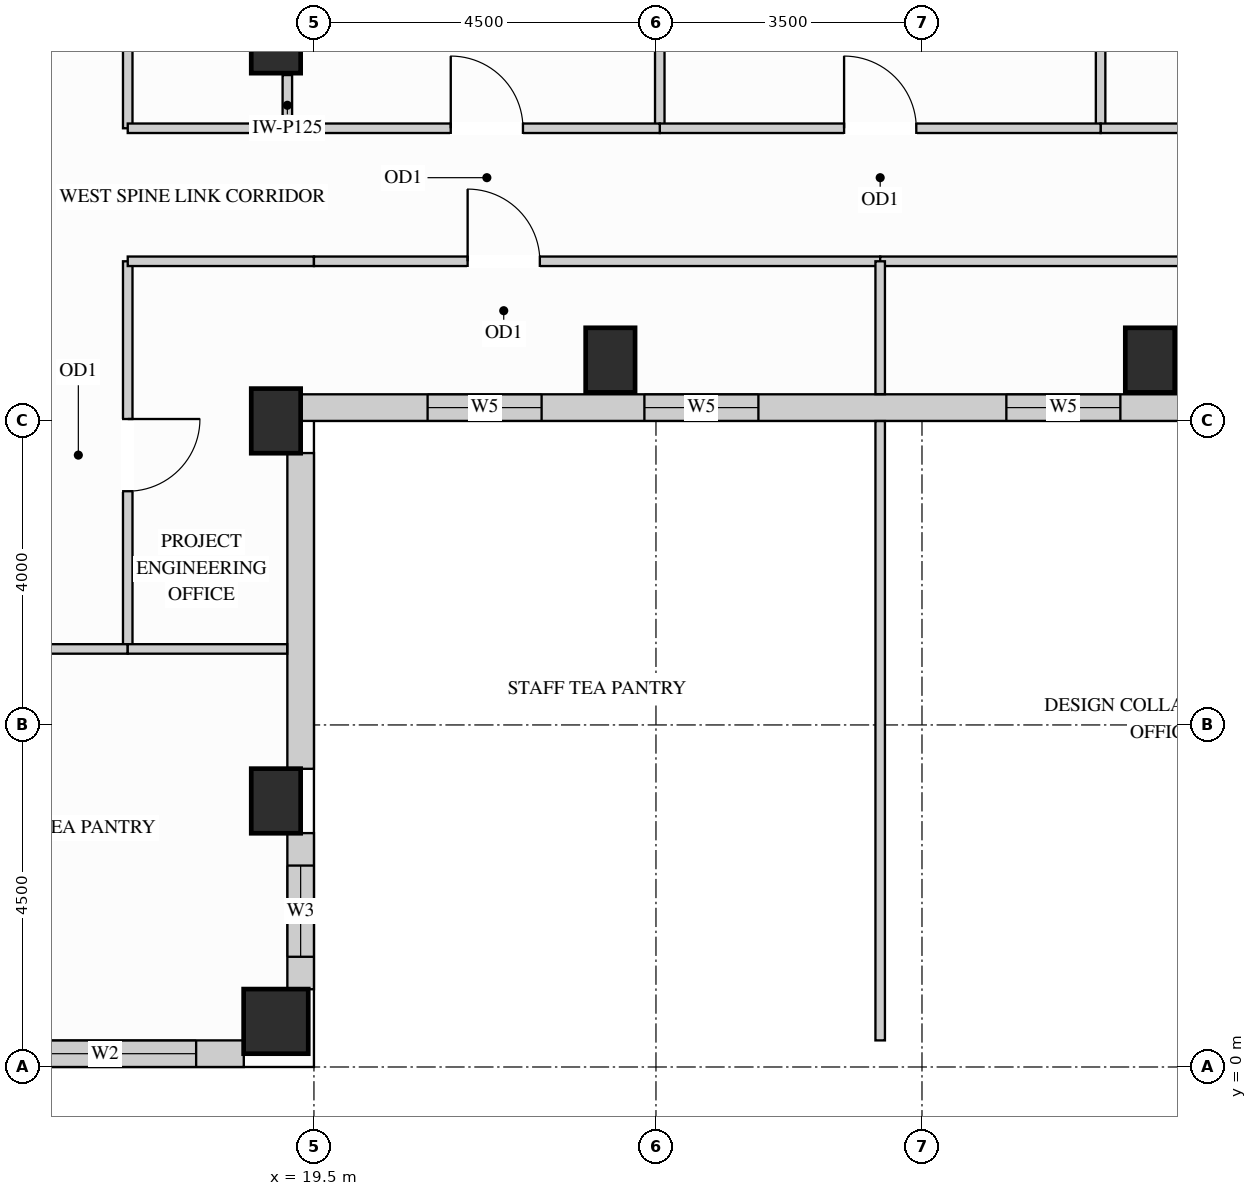
"""IFC4 building model, lengths in metres.
Left out: names, types, materials, properties, quantities, classifications, styles, units other than length and angle.
Written with IfcOpenShell. Run it as: python <this file> out.ifc"""

import sys

from ifc_helpers import new_model, si_unit, direction, frame, frame_2d, origin, origin_2d, place, context, subcontext, project, spatial, rectangle, extrude, source, transform, mapped, element, fill, save


model = new_model("IFC4")
c1 = context("Model", 3, precision=1e-05, world=origin(), true_north=direction((0.0, 1.0)))
c2 = subcontext(c1, "Body", "Model", "MODEL_VIEW")
j1 = project(units=[si_unit("LENGTHUNIT", "METRE"), si_unit("PLANEANGLEUNIT", "RADIAN")], contexts=[c1])
p1 = place(None, origin())
s1 = spatial("IfcSite", under=j1, at=p1, CompositionType="ELEMENT")
p2 = place(p1, origin())
s2 = spatial("IfcBuilding", under=s1, at=p2, CompositionType="ELEMENT")
p3 = place(p2, frame((0.0, 0.0, 237.6)))
s3 = spatial("IfcBuildingStorey", under=s2, at=p3, CompositionType="ELEMENT", Elevation=237.6)
m1 = source(origin(), c2, "Body", "SweptSolid", [
    extrude(rectangle(XDim=0.65, YDim=0.85, at=origin_2d()), origin(), (0.0, 0.0, 1.0), 3.4),
])
for number, where, z_axis, x_axis in (
    (1, (19.0, 13.5, 0.0), (0.0, 0.0, 1.0), (1.0, 0.0, 0.0)),
    (2, (19.0, 3.5, 0.0), (0.0, 0.0, 1.0), (1.0, 0.0, 0.0)),
    (3, (19.0, 8.5, 0.0), (0.0, 0.0, 1.0), (1.0, 0.0, 0.0)),
    (4, (23.4, 9.3, 0.0), (0.0, 0.0, 1.0), (1.0, 0.0, 0.0)),
    (5, (30.5, 9.3, 0.0), (0.0, 0.0, 1.0), (1.0, 0.0, 0.0)),
):
    element("IfcColumn", number, at=place(p3, frame(where, z_axis=z_axis, x_axis=x_axis)), inside=s3, PredefinedType="COLUMN", context=c2, shape_type="MappedRepresentation", body=[
        mapped(m1, transform((0.0, 0.0, 0.0), x_axis=(1.0, 0.0, 0.0), y_axis=(0.0, 1.0, 0.0), z_axis=(0.0, 0.0, 1.0))),
    ])
m2 = source(origin(), c2, "Body", "SweptSolid", [
    extrude(rectangle(XDim=0.85, YDim=0.85, at=origin_2d()), origin(), (0.0, 0.0, 1.0), 3.4),
])
p4 = place(p3, frame((19.0, 0.6, 0.0), z_axis=(0.0, 0.0, 1.0), x_axis=(1.0, 0.0, 0.0)))
e6 = element("IfcColumn", 6, at=p4, inside=s3, PredefinedType="COLUMN", context=c2, shape_type="MappedRepresentation", body=[
    mapped(m2, transform((0.0, 0.0, 0.0), x_axis=(1.0, 0.0, 0.0), y_axis=(0.0, 1.0, 0.0), z_axis=(0.0, 0.0, 1.0))),
])
p5 = place(p3, frame((14.923, 0.175, 0.0), z_axis=(0.0, 0.0, 1.0), x_axis=(1.0, 0.0, 0.0)))
e7 = element("IfcWall", 7, at=p5, inside=s3, PredefinedType="SOLIDWALL", context=c2, shape_type="SweptSolid", body=[
    extrude(rectangle(XDim=3.654, YDim=0.35, at=frame_2d((1.827, 0.0))), origin(), (0.0, 0.0, 1.0), 3.385),
])
p6 = place(p5, frame((0.627, 0.0, 0.78)))
e8 = element("IfcOpeningElement", 8, at=p6, cuts=e7, PredefinedType="OPENING", context=c2, shape_type="SweptSolid", body=[
    extrude(rectangle(XDim=2.4, YDim=2.1, at=frame_2d((1.2, 1.05))), frame((0.0, 0.185, 0.0), z_axis=(0.0, -1.0, 0.0), x_axis=(1.0, 0.0, 0.0)), (0.0, 0.0, 1.0), 0.37),
])
p7 = place(p3, frame((19.325, 1.023, 0.0), z_axis=(0.0, 0.0, 1.0), x_axis=(0.0, 1.0, 0.0)))
e9 = element("IfcWall", 9, at=p7, inside=s3, PredefinedType="SOLIDWALL", context=c2, shape_type="SweptSolid", body=[
    extrude(rectangle(XDim=2.054, YDim=0.35, at=frame_2d((1.027, 0.0))), origin(), (0.0, 0.0, 1.0), 2.619),
])
p8 = place(p7, frame((0.427, 0.0, 0.78)))
e10 = element("IfcOpeningElement", 10, at=p8, cuts=e9, PredefinedType="OPENING", context=c2, shape_type="SweptSolid", body=[
    extrude(rectangle(XDim=1.2, YDim=1.659, at=frame_2d((0.6, 0.83))), frame((0.0, 0.185, 0.0), z_axis=(0.0, -1.0, 0.0), x_axis=(1.0, 0.0, 0.0)), (0.0, 0.0, 1.0), 0.37),
])
m3 = source(origin(), c2, "Body", "SweptSolid", [
    extrude(rectangle(XDim=4.154, YDim=0.35, at=frame_2d((2.077, 0.0))), origin(), (0.0, 0.0, 1.0), 2.619),
])
p9 = place(p3, frame((19.325, 3.923, 0.0), z_axis=(0.0, 0.0, 1.0), x_axis=(0.0, 1.0, 0.0)))
e11 = element("IfcWall", 11, at=p9, inside=s3, PredefinedType="SOLIDWALL", context=c2, shape_type="MappedRepresentation", body=[
    mapped(m3, transform((0.0, 0.0, 0.0), x_axis=(1.0, 0.0, 0.0), y_axis=(0.0, 1.0, 0.0), z_axis=(0.0, 0.0, 1.0))),
])
p10 = place(p3, frame((19.323, 8.675, 0.0), z_axis=(0.0, 0.0, 1.0), x_axis=(1.0, 0.0, 0.0)))
e12 = element("IfcWall", 12, at=p10, inside=s3, PredefinedType="SOLIDWALL", context=c2, shape_type="SweptSolid", body=[
    extrude(rectangle(XDim=15.427, YDim=0.35, at=frame_2d((7.713, 0.0))), origin(), (0.0, 0.0, 1.0), 3.385),
])
p11 = place(p10, frame((1.672, 0.0, 0.78)))
e13 = element("IfcOpeningElement", 13, at=p11, cuts=e12, PredefinedType="OPENING", context=c2, shape_type="SweptSolid", body=[
    extrude(rectangle(XDim=1.5, YDim=2.0, at=frame_2d((0.75, 1.0))), frame((0.0, 0.185, 0.0), z_axis=(0.0, -1.0, 0.0), x_axis=(1.0, 0.0, 0.0)), (0.0, 0.0, 1.0), 0.37),
])
p12 = place(p10, frame((4.525, 0.0, 0.78)))
e14 = element("IfcOpeningElement", 14, at=p12, cuts=e12, PredefinedType="OPENING", context=c2, shape_type="SweptSolid", body=[
    extrude(rectangle(XDim=1.5, YDim=2.0, at=frame_2d((0.75, 1.0))), frame((0.0, 0.185, 0.0), z_axis=(0.0, -1.0, 0.0), x_axis=(1.0, 0.0, 0.0)), (0.0, 0.0, 1.0), 0.37),
])
p13 = place(p10, frame((9.287, 0.0, 0.78)))
e15 = element("IfcOpeningElement", 15, at=p13, cuts=e12, PredefinedType="OPENING", context=c2, shape_type="SweptSolid", body=[
    extrude(rectangle(XDim=1.5, YDim=2.0, at=frame_2d((0.75, 1.0))), frame((0.0, 0.185, 0.0), z_axis=(0.0, -1.0, 0.0), x_axis=(1.0, 0.0, 0.0)), (0.0, 0.0, 1.0), 0.37),
])
p14 = place(p10, frame((12.197, 0.0, 0.78)))
e16 = element("IfcOpeningElement", 16, at=p14, cuts=e12, PredefinedType="OPENING", context=c2, shape_type="SweptSolid", body=[
    extrude(rectangle(XDim=1.5, YDim=2.0, at=frame_2d((0.75, 1.0))), frame((0.0, 0.185, 0.0), z_axis=(0.0, -1.0, 0.0), x_axis=(1.0, 0.0, 0.0)), (0.0, 0.0, 1.0), 0.37),
])
m4 = source(origin(), c2, "Body", "SweptSolid", [
    extrude(rectangle(XDim=0.7, YDim=0.125, at=frame_2d((0.35, 0.0))), origin(), (0.0, 0.0, 1.0), 2.773),
])
p15 = place(p3, frame((19.15, 12.35, 0.0), z_axis=(0.0, 0.0, 1.0), x_axis=(0.0, 1.0, 0.0)))
e17 = element("IfcWall", 17, at=p15, inside=s3, PredefinedType="PARTITIONING", context=c2, shape_type="MappedRepresentation", body=[
    mapped(m4, transform((0.0, 0.0, 0.0), x_axis=(1.0, 0.0, 0.0), y_axis=(0.0, 1.0, 0.0), z_axis=(0.0, 0.0, 1.0))),
])
p16 = place(p3, frame((17.05, 12.35, 0.0), z_axis=(0.0, 0.0, 1.0), x_axis=(0.0, 1.0, 0.0)))
e18 = element("IfcWall", 18, at=p16, inside=s3, PredefinedType="PARTITIONING", context=c2, shape_type="SweptSolid", body=[
    extrude(rectangle(XDim=5.75, YDim=0.125, at=frame_2d((2.875, 0.0))), origin(), (0.0, 0.0, 1.0), 3.385),
])
p17 = place(p16, frame((2.4, 0.0, 0.0)))
e19 = element("IfcOpeningElement", 19, at=p17, cuts=e18, PredefinedType="OPENING", context=c2, shape_type="SweptSolid", body=[
    extrude(rectangle(XDim=0.95, YDim=2.15, at=frame_2d((0.475, 1.075))), frame((0.0, 0.073, 0.0), z_axis=(0.0, -1.0, 0.0), x_axis=(1.0, 0.0, 0.0)), (0.0, 0.0, 1.0), 0.145),
])
p18 = place(p3, frame((17.05, 5.5, 0.0), z_axis=(0.0, 0.0, 1.0), x_axis=(0.0, 1.0, 0.0)))
e20 = element("IfcWall", 20, at=p18, inside=s3, PredefinedType="PARTITIONING", context=c2, shape_type="SweptSolid", body=[
    extrude(rectangle(XDim=5.1, YDim=0.125, at=frame_2d((2.55, 0.0))), origin(), (0.0, 0.0, 1.0), 3.385),
])
p19 = place(p18, frame((2.075, 0.0, 0.0)))
e21 = element("IfcOpeningElement", 21, at=p19, cuts=e20, PredefinedType="OPENING", context=c2, shape_type="SweptSolid", body=[
    extrude(rectangle(XDim=0.95, YDim=2.15, at=frame_2d((0.475, 1.075))), frame((0.0, 0.073, 0.0), z_axis=(0.0, -1.0, 0.0), x_axis=(1.0, 0.0, 0.0)), (0.0, 0.0, 1.0), 0.145),
])
m5 = source(origin(), c2, "Body", "SweptSolid", [
    extrude(rectangle(XDim=3.798, YDim=0.125, at=frame_2d((1.899, 0.0))), origin(), (0.0, 0.0, 1.0), 3.385),
])
for number, where, z_axis, x_axis in (
    (22, (24.05, 12.35, 0.0), (0.0, 0.0, 1.0), (0.0, 1.0, 0.0)),
    (23, (29.85, 12.35, 0.0), (0.0, 0.0, 1.0), (0.0, 1.0, 0.0)),
):
    element("IfcWall", number, at=place(p3, frame(where, z_axis=z_axis, x_axis=x_axis)), inside=s3, PredefinedType="PARTITIONING", context=c2, shape_type="MappedRepresentation", body=[
        mapped(m5, transform((0.0, 0.0, 0.0), x_axis=(1.0, 0.0, 0.0), y_axis=(0.0, 1.0, 0.0), z_axis=(0.0, 0.0, 1.0))),
    ])
p20 = place(p3, frame((29.85, 12.35, 0.0), z_axis=(0.0, 0.0, 1.0), x_axis=(1.0, 0.0, 0.0)))
e24 = element("IfcWall", 24, at=p20, inside=s3, PredefinedType="PARTITIONING", context=c2, shape_type="SweptSolid", body=[
    extrude(rectangle(XDim=4.55, YDim=0.125, at=frame_2d((2.275, 0.0))), origin(), (0.0, 0.0, 1.0), 3.385),
])
p21 = place(p20, frame((1.8, 0.0, 0.0)))
e25 = element("IfcOpeningElement", 25, at=p21, cuts=e24, PredefinedType="OPENING", context=c2, shape_type="SweptSolid", body=[
    extrude(rectangle(XDim=0.95, YDim=2.15, at=frame_2d((0.475, 1.075))), frame((0.0, 0.073, 0.0), z_axis=(0.0, -1.0, 0.0), x_axis=(1.0, 0.0, 0.0)), (0.0, 0.0, 1.0), 0.145),
])
p22 = place(p3, frame((24.05, 12.35, 0.0), z_axis=(0.0, 0.0, 1.0), x_axis=(1.0, 0.0, 0.0)))
e26 = element("IfcWall", 26, at=p22, inside=s3, PredefinedType="PARTITIONING", context=c2, shape_type="SweptSolid", body=[
    extrude(rectangle(XDim=5.8, YDim=0.125, at=frame_2d((2.9, 0.0))), origin(), (0.0, 0.0, 1.0), 3.385),
])
p23 = place(p22, frame((2.425, 0.0, 0.0)))
e27 = element("IfcOpeningElement", 27, at=p23, cuts=e26, PredefinedType="OPENING", context=c2, shape_type="SweptSolid", body=[
    extrude(rectangle(XDim=0.95, YDim=2.15, at=frame_2d((0.475, 1.075))), frame((0.0, 0.073, 0.0), z_axis=(0.0, -1.0, 0.0), x_axis=(1.0, 0.0, 0.0)), (0.0, 0.0, 1.0), 0.145),
])
m6 = source(origin(), c2, "Body", "SweptSolid", [
    extrude(rectangle(XDim=2.45, YDim=0.125, at=frame_2d((1.225, 0.0))), origin(), (0.0, 0.0, 1.0), 3.385),
])
p24 = place(p3, frame((17.05, 12.35, 0.0), z_axis=(0.0, 0.0, 1.0), x_axis=(1.0, 0.0, 0.0)))
e28 = element("IfcWall", 28, at=p24, inside=s3, PredefinedType="PARTITIONING", context=c2, shape_type="MappedRepresentation", body=[
    mapped(m6, transform((0.0, 0.0, 0.0), x_axis=(1.0, 0.0, 0.0), y_axis=(0.0, 1.0, 0.0), z_axis=(0.0, 0.0, 1.0))),
])
p25 = place(p3, frame((19.5, 12.35, 0.0), z_axis=(0.0, 0.0, 1.0), x_axis=(1.0, 0.0, 0.0)))
e29 = element("IfcWall", 29, at=p25, inside=s3, PredefinedType="PARTITIONING", context=c2, shape_type="SweptSolid", body=[
    extrude(rectangle(XDim=4.55, YDim=0.125, at=frame_2d((2.275, 0.0))), origin(), (0.0, 0.0, 1.0), 3.385),
])
p26 = place(p25, frame((1.8, 0.0, 0.0)))
e30 = element("IfcOpeningElement", 30, at=p26, cuts=e29, PredefinedType="OPENING", context=c2, shape_type="SweptSolid", body=[
    extrude(rectangle(XDim=0.95, YDim=2.15, at=frame_2d((0.475, 1.075))), frame((0.0, 0.073, 0.0), z_axis=(0.0, -1.0, 0.0), x_axis=(1.0, 0.0, 0.0)), (0.0, 0.0, 1.0), 0.145),
])
p27 = place(p3, frame((17.05, 10.6, 0.0), z_axis=(0.0, 0.0, 1.0), x_axis=(1.0, 0.0, 0.0)))
e31 = element("IfcWall", 31, at=p27, inside=s3, PredefinedType="PARTITIONING", context=c2, shape_type="MappedRepresentation", body=[
    mapped(m6, transform((0.0, 0.0, 0.0), x_axis=(1.0, 0.0, 0.0), y_axis=(0.0, 1.0, 0.0), z_axis=(0.0, 0.0, 1.0))),
])
p28 = place(p3, frame((19.5, 10.6, 0.0), z_axis=(0.0, 0.0, 1.0), x_axis=(1.0, 0.0, 0.0)))
e32 = element("IfcWall", 32, at=p28, inside=s3, PredefinedType="PARTITIONING", context=c2, shape_type="SweptSolid", body=[
    extrude(rectangle(XDim=7.45, YDim=0.125, at=frame_2d((3.725, 0.0))), origin(), (0.0, 0.0, 1.0), 3.385),
])
p29 = place(p28, frame((2.022, 0.0, 0.0)))
e33 = element("IfcOpeningElement", 33, at=p29, cuts=e32, PredefinedType="OPENING", context=c2, shape_type="SweptSolid", body=[
    extrude(rectangle(XDim=0.95, YDim=2.15, at=frame_2d((0.475, 1.075))), frame((0.0, 0.073, 0.0), z_axis=(0.0, -1.0, 0.0), x_axis=(1.0, 0.0, 0.0)), (0.0, 0.0, 1.0), 0.145),
])
p30 = place(p3, frame((26.95, 10.6, 0.0), z_axis=(0.0, 0.0, 1.0), x_axis=(1.0, 0.0, 0.0)))
e34 = element("IfcWall", 34, at=p30, inside=s3, PredefinedType="PARTITIONING", context=c2, shape_type="SweptSolid", body=[
    extrude(rectangle(XDim=7.45, YDim=0.125, at=frame_2d((3.725, 0.0))), origin(), (0.0, 0.0, 1.0), 3.385),
])
p31 = place(p30, frame((4.478, 0.0, 0.0)))
e35 = element("IfcOpeningElement", 35, at=p31, cuts=e34, PredefinedType="OPENING", context=c2, shape_type="SweptSolid", body=[
    extrude(rectangle(XDim=0.95, YDim=2.15, at=frame_2d((0.475, 1.075))), frame((0.0, 0.073, 0.0), z_axis=(0.0, -1.0, 0.0), x_axis=(1.0, 0.0, 0.0)), (0.0, 0.0, 1.0), 0.145),
])
m7 = source(origin(), c2, "Body", "SweptSolid", [
    extrude(rectangle(XDim=8.148, YDim=0.125, at=frame_2d((4.074, 0.0))), origin(), (0.0, 0.0, 1.0), 3.385),
])
p32 = place(p3, frame((26.95, 0.35, 0.0), z_axis=(0.0, 0.0, 1.0), x_axis=(0.0, 1.0, 0.0)))
e36 = element("IfcWall", 36, at=p32, inside=s3, PredefinedType="PARTITIONING", context=c2, shape_type="MappedRepresentation", body=[
    mapped(m7, transform((0.0, 0.0, 0.0), x_axis=(1.0, 0.0, 0.0), y_axis=(0.0, 1.0, 0.0), z_axis=(0.0, 0.0, 1.0))),
])
m8 = source(origin(), c2, "Body", "SweptSolid", [
    extrude(rectangle(XDim=1.748, YDim=0.125, at=frame_2d((0.874, 0.0))), origin(), (0.0, 0.0, 1.0), 3.385),
])
p33 = place(p3, frame((26.95, 8.852, 0.0), z_axis=(0.0, 0.0, 1.0), x_axis=(0.0, 1.0, 0.0)))
e37 = element("IfcWall", 37, at=p33, inside=s3, PredefinedType="PARTITIONING", context=c2, shape_type="MappedRepresentation", body=[
    mapped(m8, transform((0.0, 0.0, 0.0), x_axis=(1.0, 0.0, 0.0), y_axis=(0.0, 1.0, 0.0), z_axis=(0.0, 0.0, 1.0))),
])
p34 = place(p3, frame((10.875, 5.5, 0.0), z_axis=(0.0, 0.0, 1.0), x_axis=(1.0, 0.0, 0.0)))
e38 = element("IfcWall", 38, at=p34, inside=s3, PredefinedType="PARTITIONING", context=c2, shape_type="SweptSolid", body=[
    extrude(rectangle(XDim=6.175, YDim=0.125, at=frame_2d((3.087, 0.0))), origin(), (0.0, 0.0, 1.0), 3.385),
])
p35 = place(p34, frame((2.613, 0.0, 0.0)))
e39 = element("IfcOpeningElement", 39, at=p35, cuts=e38, PredefinedType="OPENING", context=c2, shape_type="SweptSolid", body=[
    extrude(rectangle(XDim=0.95, YDim=2.15, at=frame_2d((0.475, 1.075))), frame((0.0, 0.073, 0.0), z_axis=(0.0, -1.0, 0.0), x_axis=(1.0, 0.0, 0.0)), (0.0, 0.0, 1.0), 0.145),
])
m9 = source(origin(), c2, "Body", "SweptSolid", [
    extrude(rectangle(XDim=2.098, YDim=0.125, at=frame_2d((1.049, 0.0))), origin(), (0.0, 0.0, 1.0), 3.385),
])
p36 = place(p3, frame((17.05, 5.5, 0.0), z_axis=(0.0, 0.0, 1.0), x_axis=(1.0, 0.0, 0.0)))
e40 = element("IfcWall", 40, at=p36, inside=s3, PredefinedType="PARTITIONING", context=c2, shape_type="MappedRepresentation", body=[
    mapped(m9, transform((0.0, 0.0, 0.0), x_axis=(1.0, 0.0, 0.0), y_axis=(0.0, 1.0, 0.0), z_axis=(0.0, 0.0, 1.0))),
])
m10 = source(origin(), c2, "Body", "SweptSolid", [
    extrude(rectangle(XDim=0.95, YDim=2.15, at=frame_2d((0.475, 1.075))), frame((0.0, 0.025, 0.0), z_axis=(0.0, -1.0, 0.0), x_axis=(1.0, 0.0, 0.0)), (0.0, 0.0, 1.0), 0.05),
])
p37 = place(p19, origin())
e41 = element("IfcDoor", 41, at=p37, inside=s3, OperationType="SINGLE_SWING_RIGHT", PredefinedType="DOOR", context=c2, shape_type="MappedRepresentation", body=[
    mapped(m10, transform((0.0, 0.0, 0.0), x_axis=(1.0, 0.0, 0.0), y_axis=(0.0, 1.0, 0.0), z_axis=(0.0, 0.0, 1.0))),
])
fill(e21, e41)
p38 = place(p23, origin())
e42 = element("IfcDoor", 42, at=p38, inside=s3, OperationType="SINGLE_SWING_LEFT", PredefinedType="DOOR", context=c2, shape_type="MappedRepresentation", body=[
    mapped(m10, transform((0.0, 0.0, 0.0), x_axis=(1.0, 0.0, 0.0), y_axis=(0.0, 1.0, 0.0), z_axis=(0.0, 0.0, 1.0))),
])
fill(e27, e42)
p39 = place(p26, origin())
e43 = element("IfcDoor", 43, at=p39, inside=s3, OperationType="SINGLE_SWING_LEFT", PredefinedType="DOOR", context=c2, shape_type="MappedRepresentation", body=[
    mapped(m10, transform((0.0, 0.0, 0.0), x_axis=(1.0, 0.0, 0.0), y_axis=(0.0, 1.0, 0.0), z_axis=(0.0, 0.0, 1.0))),
])
fill(e30, e43)
p40 = place(p29, origin())
e44 = element("IfcDoor", 44, at=p40, inside=s3, OperationType="SINGLE_SWING_LEFT", PredefinedType="DOOR", context=c2, shape_type="MappedRepresentation", body=[
    mapped(m10, transform((0.0, 0.0, 0.0), x_axis=(1.0, 0.0, 0.0), y_axis=(0.0, 1.0, 0.0), z_axis=(0.0, 0.0, 1.0))),
])
fill(e33, e44)
m11 = source(origin(), c2, "Body", "SweptSolid", [
    extrude(rectangle(XDim=2.4, YDim=2.1, at=frame_2d((1.2, 1.05))), frame((0.0, 0.03, 0.0), z_axis=(0.0, -1.0, 0.0), x_axis=(1.0, 0.0, 0.0)), (0.0, 0.0, 1.0), 0.06),
])
p41 = place(p6, origin())
e45 = element("IfcWindow", 45, at=p41, inside=s3, PartitioningType="SINGLE_PANEL", PredefinedType="WINDOW", context=c2, shape_type="MappedRepresentation", body=[
    mapped(m11, transform((0.0, 0.0, 0.0), x_axis=(1.0, 0.0, 0.0), y_axis=(0.0, 1.0, 0.0), z_axis=(0.0, 0.0, 1.0))),
])
fill(e8, e45)
m12 = source(origin(), c2, "Body", "SweptSolid", [
    extrude(rectangle(XDim=1.2, YDim=1.659, at=frame_2d((0.6, 0.83))), frame((0.0, 0.03, 0.0), z_axis=(0.0, -1.0, 0.0), x_axis=(1.0, 0.0, 0.0)), (0.0, 0.0, 1.0), 0.06),
])
p42 = place(p8, origin())
e46 = element("IfcWindow", 46, at=p42, inside=s3, PartitioningType="SINGLE_PANEL", PredefinedType="WINDOW", context=c2, shape_type="MappedRepresentation", body=[
    mapped(m12, transform((0.0, 0.0, 0.0), x_axis=(1.0, 0.0, 0.0), y_axis=(0.0, 1.0, 0.0), z_axis=(0.0, 0.0, 1.0))),
])
fill(e10, e46)
m13 = source(origin(), c2, "Body", "SweptSolid", [
    extrude(rectangle(XDim=1.5, YDim=2.0, at=frame_2d((0.75, 1.0))), frame((0.0, 0.03, 0.0), z_axis=(0.0, -1.0, 0.0), x_axis=(1.0, 0.0, 0.0)), (0.0, 0.0, 1.0), 0.06),
])
p43 = place(p11, origin())
e47 = element("IfcWindow", 47, at=p43, inside=s3, PartitioningType="SINGLE_PANEL", PredefinedType="WINDOW", context=c2, shape_type="MappedRepresentation", body=[
    mapped(m13, transform((0.0, 0.0, 0.0), x_axis=(1.0, 0.0, 0.0), y_axis=(0.0, 1.0, 0.0), z_axis=(0.0, 0.0, 1.0))),
])
fill(e13, e47)
p44 = place(p12, origin())
e48 = element("IfcWindow", 48, at=p44, inside=s3, PartitioningType="SINGLE_PANEL", PredefinedType="WINDOW", context=c2, shape_type="MappedRepresentation", body=[
    mapped(m13, transform((0.0, 0.0, 0.0), x_axis=(1.0, 0.0, 0.0), y_axis=(0.0, 1.0, 0.0), z_axis=(0.0, 0.0, 1.0))),
])
fill(e14, e48)
p45 = place(p13, origin())
e49 = element("IfcWindow", 49, at=p45, inside=s3, PartitioningType="SINGLE_PANEL", PredefinedType="WINDOW", context=c2, shape_type="MappedRepresentation", body=[
    mapped(m13, transform((0.0, 0.0, 0.0), x_axis=(1.0, 0.0, 0.0), y_axis=(0.0, 1.0, 0.0), z_axis=(0.0, 0.0, 1.0))),
])
fill(e15, e49)
save(model, sys.argv[1])
